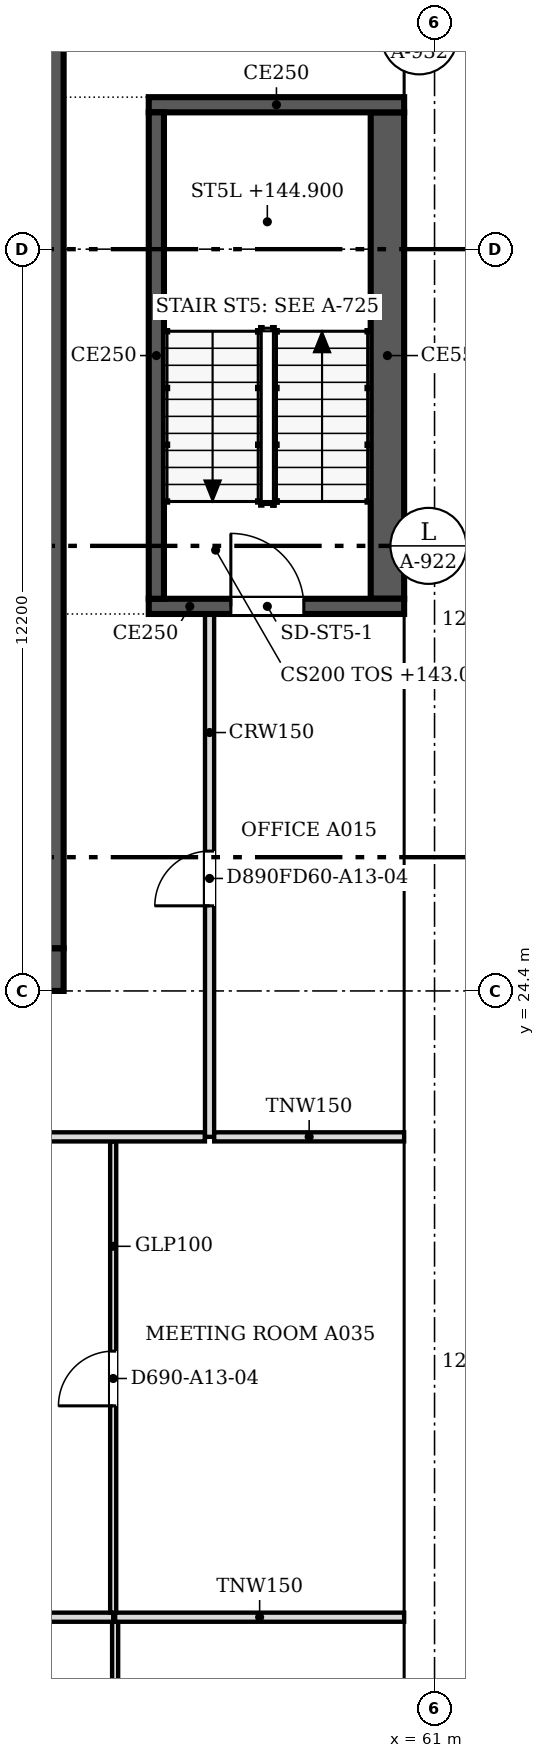
"""IFC4 building model, lengths in metres.
Left out: names, types, materials, properties, quantities, classifications, styles, units other than length and angle.
Written with IfcOpenShell. Run it as: python <this file> out.ifc"""

import sys

from ifc_helpers import new_model, si_unit, direction, frame, frame_2d, origin, place, context, subcontext, project, spatial, polyline, rectangle, outline, extrude, faceted_brep, source, transform, mapped, element, fill, save


model = new_model("IFC4")
c1 = context("Model", 3, precision=1e-05, world=origin(), true_north=direction((0.0, 1.0)))
c2 = subcontext(c1, "Body", "Model", "MODEL_VIEW")
j1 = project(units=[si_unit("LENGTHUNIT", "METRE"), si_unit("PLANEANGLEUNIT", "RADIAN")], contexts=[c1])
p1 = place(None, origin())
s1 = spatial("IfcSite", under=j1, at=p1, CompositionType="ELEMENT")
p2 = place(p1, origin())
s2 = spatial("IfcBuilding", under=s1, at=p2, CompositionType="ELEMENT")
p3 = place(p2, frame((0.0, 0.0, 143.0)))
s3 = spatial("IfcBuildingStorey", under=s2, at=p3, CompositionType="ELEMENT", Elevation=143.0)
m1 = source(origin(), c2, "Body", "SweptSolid", [
    extrude(outline(polyline([(3.05, 0.0), (6.1, 3.8), (3.05, 7.6), (0.0, 3.8), (3.05, 0.0)])), frame((0.0, 0.25, 0.0), z_axis=(0.0, -1.0, 0.0), x_axis=(1.0, 0.0, 0.0)), (0.0, 0.0, 1.0), 0.5),
])
p4 = place(p3, frame((60.75, 12.2, -3.8), z_axis=(0.0, 0.0, 1.0), x_axis=(0.0, 1.0, 0.0)))
e1 = element("IfcWall", 1, at=p4, inside=s3, PredefinedType="SOLIDWALL", context=c2, shape_type="MappedRepresentation", body=[
    mapped(m1, transform((0.0, 0.0, 0.0), scale=1.0)),
])
m2 = source(origin(), c2, "Body", "SweptSolid", [
    extrude(outline(polyline([(3.05, 0.399), (5.78, 3.8), (3.05, 7.201), (0.321, 3.8), (3.05, 0.399)])), frame((0.0, 0.26, 0.0), z_axis=(0.0, -1.0, 0.0), x_axis=(1.0, 0.0, 0.0)), (0.0, 0.0, 1.0), 0.52),
])
p5 = place(p4, origin())
e2 = element("IfcOpeningElement", 2, at=p5, cuts=e1, PredefinedType="OPENING", context=c2, shape_type="MappedRepresentation", body=[
    mapped(m2, transform((0.0, 0.0, 0.0), scale=1.0)),
])
m3 = source(origin(), c2, "Body", "Brep", [
    faceted_brep([(3.05, -0.25, 0.0), (6.1, -0.25, 3.8), (6.1, -0.25, 3.8), (3.05, -0.25, 7.6), (0.0, -0.25, 3.8), (0.0, 0.25, 3.8), (3.05, 0.25, 7.6), (6.1, 0.25, 3.8), (6.1, 0.25, 3.8), (3.05, 0.25, 0.0)], [[[0, 1, 2, 3, 4]], [[5, 6, 7, 8, 9]], [[9, 8, 1, 0]], [[7, 6, 3, 2]], [[6, 5, 4, 3]], [[5, 9, 0, 4]], [[1, 8, 7, 2]]]),
])
p6 = place(p3, frame((60.75, 18.3, -3.8), z_axis=(0.0, 0.0, 1.0), x_axis=(0.0, 1.0, 0.0)))
e3 = element("IfcWall", 3, at=p6, inside=s3, PredefinedType="SOLIDWALL", context=c2, shape_type="MappedRepresentation", body=[
    mapped(m3, transform((0.0, 0.0, 0.0), scale=1.0)),
])
p7 = place(p6, origin())
e4 = element("IfcOpeningElement", 4, at=p7, cuts=e3, PredefinedType="OPENING", context=c2, shape_type="MappedRepresentation", body=[
    mapped(m2, transform((0.0, 0.0, 0.0), scale=1.0)),
])
p8 = place(p3, frame((60.75, 24.4, -3.8), z_axis=(0.0, 0.0, 1.0), x_axis=(0.0, 1.0, 0.0)))
e5 = element("IfcWall", 5, at=p8, inside=s3, PredefinedType="SOLIDWALL", context=c2, shape_type="MappedRepresentation", body=[
    mapped(m1, transform((0.0, 0.0, 0.0), scale=1.0)),
])
p9 = place(p8, origin())
e6 = element("IfcOpeningElement", 6, at=p9, cuts=e5, PredefinedType="OPENING", context=c2, shape_type="MappedRepresentation", body=[
    mapped(m2, transform((0.0, 0.0, 0.0), scale=1.0)),
])
p10 = place(p3, frame((60.75, 30.5, -3.8), z_axis=(0.0, 0.0, 1.0), x_axis=(0.0, 1.0, 0.0)))
e7 = element("IfcWall", 7, at=p10, inside=s3, PredefinedType="SOLIDWALL", context=c2, shape_type="MappedRepresentation", body=[
    mapped(m1, transform((0.0, 0.0, 0.0), scale=1.0)),
])
p11 = place(p10, origin())
e8 = element("IfcOpeningElement", 8, at=p11, cuts=e7, PredefinedType="OPENING", context=c2, shape_type="MappedRepresentation", body=[
    mapped(m2, transform((0.0, 0.0, 0.0), scale=1.0)),
])
p12 = place(p3, frame((60.75, 36.6, -3.8), z_axis=(0.0, 0.0, 1.0), x_axis=(0.0, 1.0, 0.0)))
e9 = element("IfcWall", 9, at=p12, inside=s3, PredefinedType="SOLIDWALL", context=c2, shape_type="MappedRepresentation", body=[
    mapped(m3, transform((0.0, 0.0, 0.0), scale=1.0)),
])
p13 = place(p12, origin())
e10 = element("IfcOpeningElement", 10, at=p13, cuts=e9, PredefinedType="OPENING", context=c2, shape_type="MappedRepresentation", body=[
    mapped(m2, transform((0.0, 0.0, 0.0), scale=1.0)),
])
p14 = place(p2, frame((0.0, 0.0, 146.8)))
s4 = spatial("IfcBuildingStorey", under=s2, at=p14, CompositionType="ELEMENT", Elevation=146.8)
p15 = place(p14, frame((60.75, 9.15, -3.8), z_axis=(0.0, 0.0, 1.0), x_axis=(0.0, 1.0, 0.0)))
e11 = element("IfcWall", 11, at=p15, inside=s4, PredefinedType="SOLIDWALL", context=c2, shape_type="MappedRepresentation", body=[
    mapped(m1, transform((0.0, 0.0, 0.0), scale=1.0)),
])
p16 = place(p15, origin())
e12 = element("IfcOpeningElement", 12, at=p16, cuts=e11, PredefinedType="OPENING", context=c2, shape_type="MappedRepresentation", body=[
    mapped(m2, transform((0.0, 0.0, 0.0), scale=1.0)),
])
p17 = place(p14, frame((60.75, 15.25, -3.8), z_axis=(0.0, 0.0, 1.0), x_axis=(0.0, 1.0, 0.0)))
e13 = element("IfcWall", 13, at=p17, inside=s4, PredefinedType="SOLIDWALL", context=c2, shape_type="MappedRepresentation", body=[
    mapped(m1, transform((0.0, 0.0, 0.0), scale=1.0)),
])
p18 = place(p17, origin())
e14 = element("IfcOpeningElement", 14, at=p18, cuts=e13, PredefinedType="OPENING", context=c2, shape_type="MappedRepresentation", body=[
    mapped(m2, transform((0.0, 0.0, 0.0), scale=1.0)),
])
p19 = place(p14, frame((60.75, 21.35, -3.8), z_axis=(0.0, 0.0, 1.0), x_axis=(0.0, 1.0, 0.0)))
e15 = element("IfcWall", 15, at=p19, inside=s4, PredefinedType="SOLIDWALL", context=c2, shape_type="MappedRepresentation", body=[
    mapped(m3, transform((0.0, 0.0, 0.0), scale=1.0)),
])
p20 = place(p19, origin())
e16 = element("IfcOpeningElement", 16, at=p20, cuts=e15, PredefinedType="OPENING", context=c2, shape_type="MappedRepresentation", body=[
    mapped(m2, transform((0.0, 0.0, 0.0), scale=1.0)),
])
p21 = place(p14, frame((60.75, 27.45, -3.8), z_axis=(0.0, 0.0, 1.0), x_axis=(0.0, 1.0, 0.0)))
e17 = element("IfcWall", 17, at=p21, inside=s4, PredefinedType="SOLIDWALL", context=c2, shape_type="MappedRepresentation", body=[
    mapped(m1, transform((0.0, 0.0, 0.0), scale=1.0)),
])
p22 = place(p21, origin())
e18 = element("IfcOpeningElement", 18, at=p22, cuts=e17, PredefinedType="OPENING", context=c2, shape_type="MappedRepresentation", body=[
    mapped(m2, transform((0.0, 0.0, 0.0), scale=1.0)),
])
p23 = place(p14, frame((60.75, 33.55, -3.8), z_axis=(0.0, 0.0, 1.0), x_axis=(0.0, 1.0, 0.0)))
e19 = element("IfcWall", 19, at=p23, inside=s4, PredefinedType="SOLIDWALL", context=c2, shape_type="MappedRepresentation", body=[
    mapped(m3, transform((0.0, 0.0, 0.0), scale=1.0)),
])
p24 = place(p23, origin())
e20 = element("IfcOpeningElement", 20, at=p24, cuts=e19, PredefinedType="OPENING", context=c2, shape_type="MappedRepresentation", body=[
    mapped(m2, transform((0.0, 0.0, 0.0), scale=1.0)),
])
p25 = place(p14, frame((60.75, 39.65, -3.8), z_axis=(0.0, 0.0, 1.0), x_axis=(0.0, 1.0, 0.0)))
e21 = element("IfcWall", 21, at=p25, inside=s4, PredefinedType="SOLIDWALL", context=c2, shape_type="MappedRepresentation", body=[
    mapped(m1, transform((0.0, 0.0, 0.0), scale=1.0)),
])
p26 = place(p25, origin())
e22 = element("IfcOpeningElement", 22, at=p26, cuts=e21, PredefinedType="OPENING", context=c2, shape_type="MappedRepresentation", body=[
    mapped(m2, transform((0.0, 0.0, 0.0), scale=1.0)),
])
p27 = place(p3, frame((54.9, 24.75, 0.0), z_axis=(0.0, 0.0, 1.0), x_axis=(-1.0, 0.0, 0.0)))
e23 = element("IfcWall", 23, at=p27, inside=s3, PredefinedType="SHEAR", context=c2, shape_type="SweptSolid", body=[
    extrude(rectangle(XDim=24.4, YDim=0.7, at=frame_2d((12.2, 0.0))), origin(), (0.0, 0.0, 1.0), 3.8),
])
m4 = source(origin(), c2, "Body", "SweptSolid", [
    extrude(rectangle(XDim=1.2, YDim=2.1, at=frame_2d((0.6, 1.05))), frame((0.0, 0.36, 0.0), z_axis=(0.0, -1.0, 0.0), x_axis=(1.0, 0.0, 0.0)), (0.0, 0.0, 1.0), 0.72),
])
p28 = place(p27, frame((1.5, 0.0, 0.0)))
e24 = element("IfcOpeningElement", 24, at=p28, cuts=e23, PredefinedType="OPENING", context=c2, shape_type="MappedRepresentation", body=[
    mapped(m4, transform((0.0, 0.0, 0.0), scale=1.0)),
])
p29 = place(p3, frame((54.55, 48.1, 0.0), z_axis=(0.0, 0.0, 1.0), x_axis=(0.0, -1.0, 0.0)))
e25 = element("IfcWall", 25, at=p29, inside=s3, PredefinedType="SHEAR", context=c2, shape_type="SweptSolid", body=[
    extrude(rectangle(XDim=23.0, YDim=0.7, at=frame_2d((11.5, 0.0))), origin(), (0.0, 0.0, 1.0), 3.8),
])
p30 = place(p29, frame((4.8, 0.0, 0.0)))
e26 = element("IfcOpeningElement", 26, at=p30, cuts=e25, PredefinedType="OPENING", context=c2, shape_type="MappedRepresentation", body=[
    mapped(m4, transform((0.0, 0.0, 0.0), scale=1.0)),
])
p31 = place(p3, frame((60.5, 30.725, 0.0), z_axis=(0.0, 0.0, 1.0), x_axis=(-1.0, 0.0, 0.0)))
e27 = element("IfcWall", 27, at=p31, inside=s3, PredefinedType="SOLIDWALL", context=c2, shape_type="SweptSolid", body=[
    extrude(rectangle(XDim=4.2, YDim=0.25, at=frame_2d((2.1, 0.0))), origin(), (0.0, 0.0, 1.0), 3.8),
])
m5 = source(origin(), c2, "Body", "SweptSolid", [
    extrude(rectangle(XDim=1.2, YDim=2.1, at=frame_2d((0.6, 1.05))), frame((0.0, 0.135, 0.0), z_axis=(0.0, -1.0, 0.0), x_axis=(1.0, 0.0, 0.0)), (0.0, 0.0, 1.0), 0.27),
])
p32 = place(p31, frame((1.65, 0.0, 0.0)))
e28 = element("IfcOpeningElement", 28, at=p32, cuts=e27, PredefinedType="OPENING", context=c2, shape_type="MappedRepresentation", body=[
    mapped(m5, transform((0.0, 0.0, 0.0), scale=1.0)),
])
p33 = place(p3, frame((56.425, 30.85, 0.0), z_axis=(0.0, 0.0, 1.0), x_axis=(0.0, 1.0, 0.0)))
e29 = element("IfcWall", 29, at=p33, inside=s3, PredefinedType="SOLIDWALL", context=c2, shape_type="SweptSolid", body=[
    extrude(rectangle(XDim=8.0, YDim=0.25, at=frame_2d((4.0, 0.0))), origin(), (0.0, 0.0, 1.0), 3.8),
])
p34 = place(p3, frame((56.3, 38.975, 0.0), z_axis=(0.0, 0.0, 1.0), x_axis=(1.0, 0.0, 0.0)))
e30 = element("IfcWall", 30, at=p34, inside=s3, PredefinedType="SOLIDWALL", context=c2, shape_type="SweptSolid", body=[
    extrude(rectangle(XDim=4.2, YDim=0.25, at=frame_2d((2.1, 0.0))), origin(), (0.0, 0.0, 1.0), 3.8),
])
p35 = place(p3, frame((60.225, 38.85, 0.0), z_axis=(0.0, 0.0, 1.0), x_axis=(0.0, -1.0, 0.0)))
e31 = element("IfcWall", 31, at=p35, inside=s3, PredefinedType="SOLIDWALL", context=c2, shape_type="SweptSolid", body=[
    extrude(rectangle(XDim=8.0, YDim=0.55, at=frame_2d((4.0, 0.0))), origin(), (0.0, 0.0, 1.0), 3.8),
])
p36 = place(p3, frame((55.747, 14.024, 0.0), z_axis=(0.0, 0.0, 1.0), x_axis=(0.0, -1.0, 0.0)))
e32 = element("IfcWall", 32, at=p36, inside=s3, PredefinedType="PARTITIONING", context=c2, shape_type="SweptSolid", body=[
    extrude(rectangle(XDim=5.924, YDim=0.1, at=frame_2d((2.962, 0.0))), origin(), (0.0, 0.0, 1.0), 3.067),
])
m6 = source(origin(), c2, "Body", "SweptSolid", [
    extrude(rectangle(XDim=0.9, YDim=2.1, at=frame_2d((0.45, 1.05))), frame((0.0, 0.06, 0.0), z_axis=(0.0, -1.0, 0.0), x_axis=(1.0, 0.0, 0.0)), (0.0, 0.0, 1.0), 0.12),
])
p37 = place(p36, frame((2.524, 0.0, 0.0)))
e33 = element("IfcOpeningElement", 33, at=p37, cuts=e32, PredefinedType="OPENING", context=c2, shape_type="MappedRepresentation", body=[
    mapped(m6, transform((0.0, 0.0, 0.0), scale=1.0)),
])
p38 = place(p3, frame((46.476, 14.1, 0.0), z_axis=(0.0, 0.0, 1.0), x_axis=(1.0, 0.0, 0.0)))
e34 = element("IfcWall", 34, at=p38, inside=s3, PredefinedType="PARTITIONING", context=c2, shape_type="SweptSolid", body=[
    extrude(rectangle(XDim=9.239, YDim=0.15, at=frame_2d((4.62, 0.0))), origin(), (0.0, 0.0, 1.0), 3.067),
])
p39 = place(p3, frame((55.747, 14.1, 0.0), z_axis=(0.0, 0.0, 1.0), x_axis=(1.0, 0.0, 0.0)))
e35 = element("IfcWall", 35, at=p39, inside=s3, PredefinedType="PARTITIONING", context=c2, shape_type="SweptSolid", body=[
    extrude(rectangle(XDim=4.753, YDim=0.15, at=frame_2d((2.376, 0.0))), origin(), (0.0, 0.0, 1.0), 3.067),
])
p40 = place(p3, frame((55.715, 21.924, 0.0), z_axis=(0.0, 0.0, 1.0), x_axis=(0.0, -1.0, 0.0)))
e36 = element("IfcWall", 36, at=p40, inside=s3, PredefinedType="PARTITIONING", context=c2, shape_type="SweptSolid", body=[
    extrude(rectangle(XDim=7.748, YDim=0.1, at=frame_2d((3.874, 0.0))), origin(), (0.0, 0.0, 1.0), 3.067),
])
p41 = place(p40, frame((3.448, 0.0, 0.0)))
e37 = element("IfcOpeningElement", 37, at=p41, cuts=e36, PredefinedType="OPENING", context=c2, shape_type="MappedRepresentation", body=[
    mapped(m6, transform((0.0, 0.0, 0.0), scale=1.0)),
])
p42 = place(p3, frame((46.4, 22.0, 0.0), z_axis=(0.0, 0.0, 1.0), x_axis=(1.0, 0.0, 0.0)))
e38 = element("IfcWall", 38, at=p42, inside=s3, PredefinedType="PARTITIONING", context=c2, shape_type="SweptSolid", body=[
    extrude(rectangle(XDim=10.824, YDim=0.15, at=frame_2d((5.412, 0.0))), origin(), (0.0, 0.0, 1.0), 3.067),
])
p43 = place(p3, frame((57.3, 30.6, 0.0), z_axis=(0.0, 0.0, 1.0), x_axis=(0.0, -1.0, 0.0)))
e39 = element("IfcWall", 39, at=p43, inside=s3, PredefinedType="PARTITIONING", context=c2, shape_type="SweptSolid", body=[
    extrude(rectangle(XDim=8.6, YDim=0.15, at=frame_2d((4.3, 0.0))), origin(), (0.0, 0.0, 1.0), 3.067),
])
m7 = source(origin(), c2, "Body", "SweptSolid", [
    extrude(rectangle(XDim=0.9, YDim=2.1, at=frame_2d((0.45, 1.05))), frame((0.0, 0.085, 0.0), z_axis=(0.0, -1.0, 0.0), x_axis=(1.0, 0.0, 0.0)), (0.0, 0.0, 1.0), 0.17),
])
p44 = place(p43, frame((3.9, 0.0, 0.0)))
e40 = element("IfcOpeningElement", 40, at=p44, cuts=e39, PredefinedType="OPENING", context=c2, shape_type="MappedRepresentation", body=[
    mapped(m7, transform((0.0, 0.0, 0.0), scale=1.0)),
])
p45 = place(p3, frame((57.376, 22.0, 0.0), z_axis=(0.0, 0.0, 1.0), x_axis=(1.0, 0.0, 0.0)))
e41 = element("IfcWall", 41, at=p45, inside=s3, PredefinedType="PARTITIONING", context=c2, shape_type="SweptSolid", body=[
    extrude(rectangle(XDim=3.124, YDim=0.15, at=frame_2d((1.562, 0.0))), origin(), (0.0, 0.0, 1.0), 3.067),
])
m8 = source(origin(), c2, "Body", "SweptSolid", [
    extrude(rectangle(XDim=1.2, YDim=2.1, at=frame_2d((0.6, 1.05))), frame((0.0, 0.025, 0.0), z_axis=(0.0, -1.0, 0.0), x_axis=(1.0, 0.0, 0.0)), (0.0, 0.0, 1.0), 0.05),
])
p46 = place(p32, origin())
e42 = element("IfcDoor", 42, at=p46, inside=s3, OperationType="SINGLE_SWING_RIGHT", PredefinedType="DOOR", context=c2, shape_type="MappedRepresentation", body=[
    mapped(m8, transform((0.0, 0.0, 0.0), scale=1.0)),
])
fill(e28, e42)
m9 = source(origin(), c2, "Body", "SweptSolid", [
    extrude(rectangle(XDim=0.9, YDim=2.1, at=frame_2d((0.45, 1.05))), frame((0.0, 0.025, 0.0), z_axis=(0.0, -1.0, 0.0), x_axis=(1.0, 0.0, 0.0)), (0.0, 0.0, 1.0), 0.05),
])
p47 = place(p41, origin())
e43 = element("IfcDoor", 43, at=p47, inside=s3, OperationType="SINGLE_SWING_RIGHT", PredefinedType="DOOR", context=c2, shape_type="MappedRepresentation", body=[
    mapped(m9, transform((0.0, 0.0, 0.0), scale=1.0)),
])
fill(e37, e43)
p48 = place(p44, origin())
e44 = element("IfcDoor", 44, at=p48, inside=s3, OperationType="SINGLE_SWING_RIGHT", PredefinedType="DOOR", context=c2, shape_type="MappedRepresentation", body=[
    mapped(m9, transform((0.0, 0.0, 0.0), scale=1.0)),
])
fill(e40, e44)
save(model, sys.argv[1])
